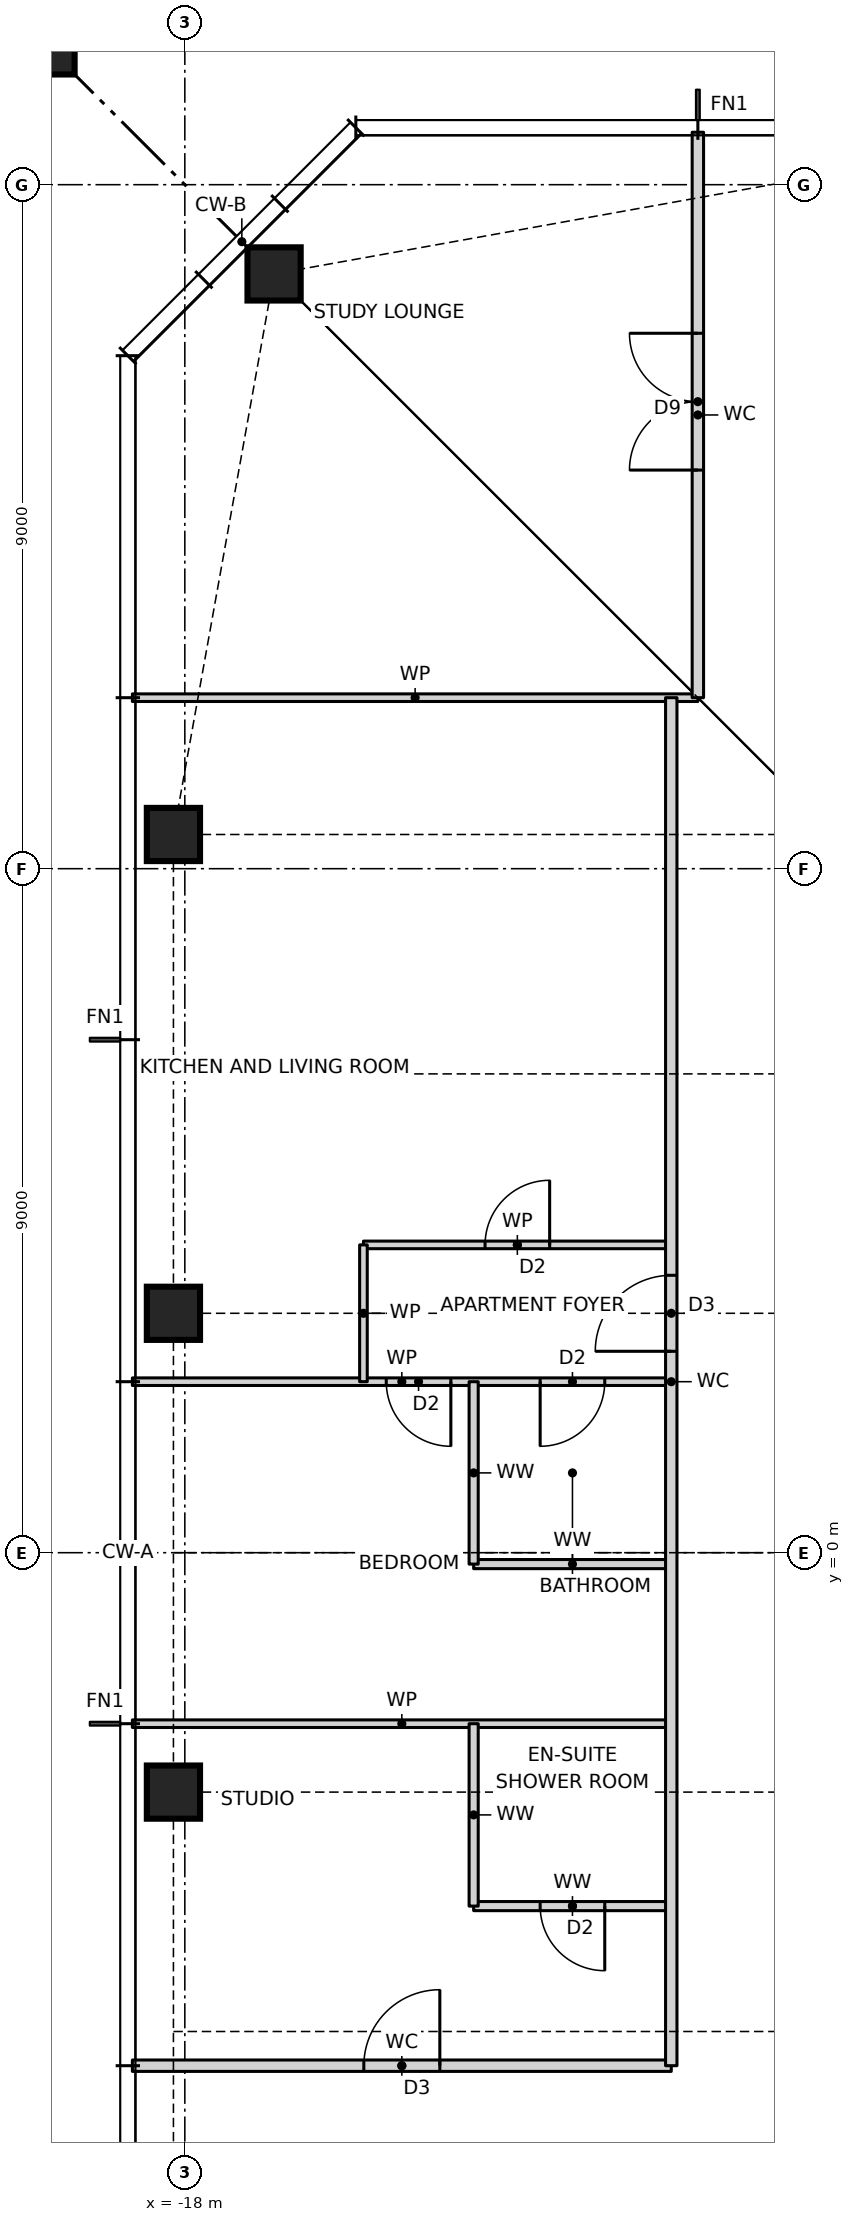
"""IFC4 building model, lengths in metres.
Left out: names, types, materials, properties, quantities, classifications, styles, units other than length and angle.
Written with IfcOpenShell. Run it as: python <this file> out.ifc"""

import sys

from ifc_helpers import new_model, si_unit, direction, frame, frame_2d, origin, origin_2d, place, context, subcontext, project, spatial, rectangle, hollow_rectangle, i_section, extrude, element, fill, save


model = new_model("IFC4")
c1 = context("Model", 3, precision=1e-05, world=origin(), true_north=direction((0.0, 1.0)))
c2 = subcontext(c1, "Body", "Model", "MODEL_VIEW")
j1 = project(units=[si_unit("LENGTHUNIT", "METRE"), si_unit("PLANEANGLEUNIT", "RADIAN")], contexts=[c1])
p1 = place(None, origin())
s1 = spatial("IfcSite", under=j1, at=p1, CompositionType="ELEMENT")
p2 = place(p1, origin())
s2 = spatial("IfcBuilding", under=s1, at=p2, CompositionType="ELEMENT")
p3 = place(p2, frame((0.0, 0.0, 163.5)))
s3 = spatial("IfcBuildingStorey", under=s2, at=p3, CompositionType="ELEMENT", Elevation=163.5)
for number, where, z_axis, x_axis in (
    (1, (-16.826, 16.826, 0.0), (0.0, 0.0, 1.0), (1.0, 0.0, 0.0)),
    (2, (-18.15, 9.45, 0.0), (0.0, 0.0, 1.0), (1.0, 0.0, 0.0)),
    (3, (-18.15, 3.15, 0.0), (0.0, 0.0, 1.0), (1.0, 0.0, 0.0)),
    (4, (-18.15, -3.15, 0.0), (0.0, 0.0, 1.0), (1.0, 0.0, 0.0)),
):
    element("IfcColumn", number, at=place(p3, frame(where, z_axis=z_axis, x_axis=x_axis)), inside=s3, PredefinedType="COLUMN", context=c2, shape_type="SweptSolid", body=[
        extrude(hollow_rectangle(XDim=0.7, YDim=0.7, WallThickness=0.06, at=origin_2d()), origin(), (0.0, 0.0, 1.0), 3.5),
    ])
p4 = place(p3, frame((-21.65, 21.65, 0.0), z_axis=(0.0, 0.0, 1.0), x_axis=(1.0, 0.0, 0.0)))
e5 = element("IfcColumn", 5, at=p4, inside=s3, PredefinedType="COLUMN", context=c2, shape_type="SweptSolid", body=[
    extrude(rectangle(XDim=4.4, YDim=4.4, at=origin_2d()), origin(), (0.0, 0.0, 1.0), 3.5),
    extrude(i_section(OverallWidth=0.478, OverallDepth=0.599, WebThickness=0.1, FlangeThickness=0.14, at=origin_2d()), origin(), (0.0, 0.0, 1.0), 3.5),
])
p5 = place(p3, frame((-18.69, -6.75, 0.0), z_axis=(0.0, 0.0, 1.0), x_axis=(1.0, 0.0, 0.0)))
e6 = element("IfcWall", 6, at=p5, inside=s3, PredefinedType="PARTITIONING", context=c2, shape_type="SweptSolid", body=[
    extrude(rectangle(XDim=7.09, YDim=0.15, at=frame_2d((3.545, 0.0))), origin(), (0.0, 0.0, 1.0), 3.27),
])
p6 = place(p5, frame((3.045, 0.0, 0.0)))
e7 = element("IfcOpeningElement", 7, at=p6, cuts=e6, PredefinedType="OPENING", context=c2, shape_type="SweptSolid", body=[
    extrude(rectangle(XDim=1.0, YDim=2.1, at=frame_2d((0.5, 1.05))), frame((0.0, 0.085, 0.0), z_axis=(0.0, -1.0, 0.0), x_axis=(1.0, 0.0, 0.0)), (0.0, 0.0, 1.0), 0.17),
])
p7 = place(p3, frame((-14.2, -4.65, 0.0), z_axis=(0.0, 0.0, 1.0), x_axis=(1.0, 0.0, 0.0)))
e8 = element("IfcWall", 8, at=p7, inside=s3, PredefinedType="PARTITIONING", context=c2, shape_type="SweptSolid", body=[
    extrude(rectangle(XDim=2.6, YDim=0.12, at=frame_2d((1.3, 0.0))), origin(), (0.0, 0.0, 1.0), 3.27),
])
p8 = place(p7, frame((0.875, 0.0, 0.0)))
e9 = element("IfcOpeningElement", 9, at=p8, cuts=e8, PredefinedType="OPENING", context=c2, shape_type="SweptSolid", body=[
    extrude(rectangle(XDim=0.85, YDim=2.1, at=frame_2d((0.425, 1.05))), frame((0.0, 0.07, 0.0), z_axis=(0.0, -1.0, 0.0), x_axis=(1.0, 0.0, 0.0)), (0.0, 0.0, 1.0), 0.14),
])
p9 = place(p3, frame((-18.69, -2.25, 0.0), z_axis=(0.0, 0.0, 1.0), x_axis=(1.0, 0.0, 0.0)))
e10 = element("IfcWall", 10, at=p9, inside=s3, PredefinedType="PARTITIONING", context=c2, shape_type="SweptSolid", body=[
    extrude(rectangle(XDim=7.09, YDim=0.1, at=frame_2d((3.545, 0.0))), origin(), (0.0, 0.0, 1.0), 3.27),
])
p10 = place(p3, frame((-14.2, -0.15, 0.0), z_axis=(0.0, 0.0, 1.0), x_axis=(1.0, 0.0, 0.0)))
e11 = element("IfcWall", 11, at=p10, inside=s3, PredefinedType="PARTITIONING", context=c2, shape_type="SweptSolid", body=[
    extrude(rectangle(XDim=2.6, YDim=0.12, at=frame_2d((1.3, 0.0))), origin(), (0.0, 0.0, 1.0), 3.27),
])
p11 = place(p3, frame((-18.69, 2.25, 0.0), z_axis=(0.0, 0.0, 1.0), x_axis=(1.0, 0.0, 0.0)))
e12 = element("IfcWall", 12, at=p11, inside=s3, PredefinedType="PARTITIONING", context=c2, shape_type="SweptSolid", body=[
    extrude(rectangle(XDim=7.09, YDim=0.1, at=frame_2d((3.545, 0.0))), origin(), (0.0, 0.0, 1.0), 3.27),
])
p12 = place(p11, frame((3.34, 0.0, 0.0)))
e13 = element("IfcOpeningElement", 13, at=p12, cuts=e12, PredefinedType="OPENING", context=c2, shape_type="SweptSolid", body=[
    extrude(rectangle(XDim=0.85, YDim=2.1, at=frame_2d((0.425, 1.05))), frame((0.0, 0.06, 0.0), z_axis=(0.0, -1.0, 0.0), x_axis=(1.0, 0.0, 0.0)), (0.0, 0.0, 1.0), 0.12),
])
p13 = place(p11, frame((5.365, 0.0, 0.0)))
e14 = element("IfcOpeningElement", 14, at=p13, cuts=e12, PredefinedType="OPENING", context=c2, shape_type="SweptSolid", body=[
    extrude(rectangle(XDim=0.85, YDim=2.1, at=frame_2d((0.425, 1.05))), frame((0.0, 0.06, 0.0), z_axis=(0.0, -1.0, 0.0), x_axis=(1.0, 0.0, 0.0)), (0.0, 0.0, 1.0), 0.12),
])
p14 = place(p3, frame((-15.65, 4.05, 0.0), z_axis=(0.0, 0.0, 1.0), x_axis=(1.0, 0.0, 0.0)))
e15 = element("IfcWall", 15, at=p14, inside=s3, PredefinedType="PARTITIONING", context=c2, shape_type="SweptSolid", body=[
    extrude(rectangle(XDim=4.05, YDim=0.1, at=frame_2d((2.025, 0.0))), origin(), (0.0, 0.0, 1.0), 3.27),
])
p15 = place(p14, frame((1.6, 0.0, 0.0)))
e16 = element("IfcOpeningElement", 16, at=p15, cuts=e15, PredefinedType="OPENING", context=c2, shape_type="SweptSolid", body=[
    extrude(rectangle(XDim=0.85, YDim=2.1, at=frame_2d((0.425, 1.05))), frame((0.0, 0.06, 0.0), z_axis=(0.0, -1.0, 0.0), x_axis=(1.0, 0.0, 0.0)), (0.0, 0.0, 1.0), 0.12),
])
p16 = place(p3, frame((-18.69, 11.25, 0.0), z_axis=(0.0, 0.0, 1.0), x_axis=(1.0, 0.0, 0.0)))
e17 = element("IfcWall", 17, at=p16, inside=s3, PredefinedType="PARTITIONING", context=c2, shape_type="SweptSolid", body=[
    extrude(rectangle(XDim=7.44, YDim=0.1, at=frame_2d((3.72, 0.0))), origin(), (0.0, 0.0, 1.0), 3.27),
])
p17 = place(p3, frame((-11.25, 11.25, 0.0), z_axis=(0.0, 0.0, 1.0), x_axis=(0.0, 1.0, 0.0)))
e18 = element("IfcWall", 18, at=p17, inside=s3, PredefinedType="PARTITIONING", context=c2, shape_type="SweptSolid", body=[
    extrude(rectangle(XDim=7.44, YDim=0.15, at=frame_2d((3.72, 0.0))), origin(), (0.0, 0.0, 1.0), 3.27),
])
p18 = place(p17, frame((2.995, 0.0, 0.0)))
e19 = element("IfcOpeningElement", 19, at=p18, cuts=e18, PredefinedType="OPENING", context=c2, shape_type="SweptSolid", body=[
    extrude(rectangle(XDim=1.8, YDim=2.1, at=frame_2d((0.9, 1.05))), frame((0.0, 0.085, 0.0), z_axis=(0.0, -1.0, 0.0), x_axis=(1.0, 0.0, 0.0)), (0.0, 0.0, 1.0), 0.17),
])
p19 = place(p3, frame((-11.6, -6.75, 0.0), z_axis=(0.0, 0.0, 1.0), x_axis=(0.0, 1.0, 0.0)))
e20 = element("IfcWall", 20, at=p19, inside=s3, PredefinedType="PARTITIONING", context=c2, shape_type="SweptSolid", body=[
    extrude(rectangle(XDim=18.0, YDim=0.15, at=frame_2d((9.0, 0.0))), origin(), (0.0, 0.0, 1.0), 3.27),
])
p20 = place(p19, frame((9.4, 0.0, 0.0)))
e21 = element("IfcOpeningElement", 21, at=p20, cuts=e20, PredefinedType="OPENING", context=c2, shape_type="SweptSolid", body=[
    extrude(rectangle(XDim=1.0, YDim=2.1, at=frame_2d((0.5, 1.05))), frame((0.0, 0.085, 0.0), z_axis=(0.0, -1.0, 0.0), x_axis=(1.0, 0.0, 0.0)), (0.0, 0.0, 1.0), 0.17),
])
for number, where, z_axis, x_axis in (
    (22, (-14.2, -4.65, 0.0), (0.0, 0.0, 1.0), (0.0, 1.0, 0.0)),
    (23, (-14.2, -0.15, 0.0), (0.0, 0.0, 1.0), (0.0, 1.0, 0.0)),
):
    element("IfcWall", number, at=place(p3, frame(where, z_axis=z_axis, x_axis=x_axis)), inside=s3, PredefinedType="PARTITIONING", context=c2, shape_type="SweptSolid", body=[
        extrude(rectangle(XDim=2.4, YDim=0.12, at=frame_2d((1.2, 0.0))), origin(), (0.0, 0.0, 1.0), 3.27),
    ])
p21 = place(p3, frame((-15.65, 2.25, 0.0), z_axis=(0.0, 0.0, 1.0), x_axis=(0.0, 1.0, 0.0)))
e24 = element("IfcWall", 24, at=p21, inside=s3, PredefinedType="PARTITIONING", context=c2, shape_type="SweptSolid", body=[
    extrude(rectangle(XDim=1.8, YDim=0.1, at=frame_2d((0.9, 0.0))), origin(), (0.0, 0.0, 1.0), 3.27),
])
p22 = place(p20, origin())
e25 = element("IfcDoor", 25, at=p22, inside=s3, OperationType="SINGLE_SWING_LEFT", PredefinedType="DOOR", context=c2, shape_type="SweptSolid", body=[
    extrude(rectangle(XDim=1.0, YDim=2.1, at=frame_2d((0.5, 1.05))), frame((0.0, 0.025, 0.0), z_axis=(0.0, -1.0, 0.0), x_axis=(1.0, 0.0, 0.0)), (0.0, 0.0, 1.0), 0.05),
])
fill(e21, e25)
p23 = place(p15, origin())
e26 = element("IfcDoor", 26, at=p23, inside=s3, OperationType="SINGLE_SWING_RIGHT", PredefinedType="DOOR", context=c2, shape_type="SweptSolid", body=[
    extrude(rectangle(XDim=0.85, YDim=2.1, at=frame_2d((0.425, 1.05))), frame((0.0, 0.025, 0.0), z_axis=(0.0, -1.0, 0.0), x_axis=(1.0, 0.0, 0.0)), (0.0, 0.0, 1.0), 0.05),
])
fill(e16, e26)
p24 = place(p12, frame((0.85, 0.0, 0.0), z_axis=(0.0, 0.0, 1.0), x_axis=(-1.0, 0.0, 0.0)))
e27 = element("IfcDoor", 27, at=p24, inside=s3, OperationType="SINGLE_SWING_LEFT", PredefinedType="DOOR", context=c2, shape_type="SweptSolid", body=[
    extrude(rectangle(XDim=0.85, YDim=2.1, at=frame_2d((0.425, 1.05))), frame((0.0, 0.025, 0.0), z_axis=(0.0, -1.0, 0.0), x_axis=(1.0, 0.0, 0.0)), (0.0, 0.0, 1.0), 0.05),
])
fill(e13, e27)
p25 = place(p13, frame((0.85, 0.0, 0.0), z_axis=(0.0, 0.0, 1.0), x_axis=(-1.0, 0.0, 0.0)))
e28 = element("IfcDoor", 28, at=p25, inside=s3, OperationType="SINGLE_SWING_RIGHT", PredefinedType="DOOR", context=c2, shape_type="SweptSolid", body=[
    extrude(rectangle(XDim=0.85, YDim=2.1, at=frame_2d((0.425, 1.05))), frame((0.0, 0.025, 0.0), z_axis=(0.0, -1.0, 0.0), x_axis=(1.0, 0.0, 0.0)), (0.0, 0.0, 1.0), 0.05),
])
fill(e14, e28)
p26 = place(p6, origin())
e29 = element("IfcDoor", 29, at=p26, inside=s3, OperationType="SINGLE_SWING_RIGHT", PredefinedType="DOOR", context=c2, shape_type="SweptSolid", body=[
    extrude(rectangle(XDim=1.0, YDim=2.1, at=frame_2d((0.5, 1.05))), frame((0.0, 0.025, 0.0), z_axis=(0.0, -1.0, 0.0), x_axis=(1.0, 0.0, 0.0)), (0.0, 0.0, 1.0), 0.05),
])
fill(e7, e29)
p27 = place(p8, frame((0.85, 0.0, 0.0), z_axis=(0.0, 0.0, 1.0), x_axis=(-1.0, 0.0, 0.0)))
e30 = element("IfcDoor", 30, at=p27, inside=s3, OperationType="SINGLE_SWING_LEFT", PredefinedType="DOOR", context=c2, shape_type="SweptSolid", body=[
    extrude(rectangle(XDim=0.85, YDim=2.1, at=frame_2d((0.425, 1.05))), frame((0.0, 0.025, 0.0), z_axis=(0.0, -1.0, 0.0), x_axis=(1.0, 0.0, 0.0)), (0.0, 0.0, 1.0), 0.05),
])
fill(e9, e30)
p28 = place(p18, origin())
e31 = element("IfcDoor", 31, at=p28, inside=s3, OperationType="DOUBLE_DOOR_SINGLE_SWING", PredefinedType="DOOR", context=c2, shape_type="SweptSolid", body=[
    extrude(rectangle(XDim=1.8, YDim=2.1, at=frame_2d((0.9, 1.05))), frame((0.0, 0.025, 0.0), z_axis=(0.0, -1.0, 0.0), x_axis=(1.0, 0.0, 0.0)), (0.0, 0.0, 1.0), 0.05),
])
fill(e19, e31)
save(model, sys.argv[1])
